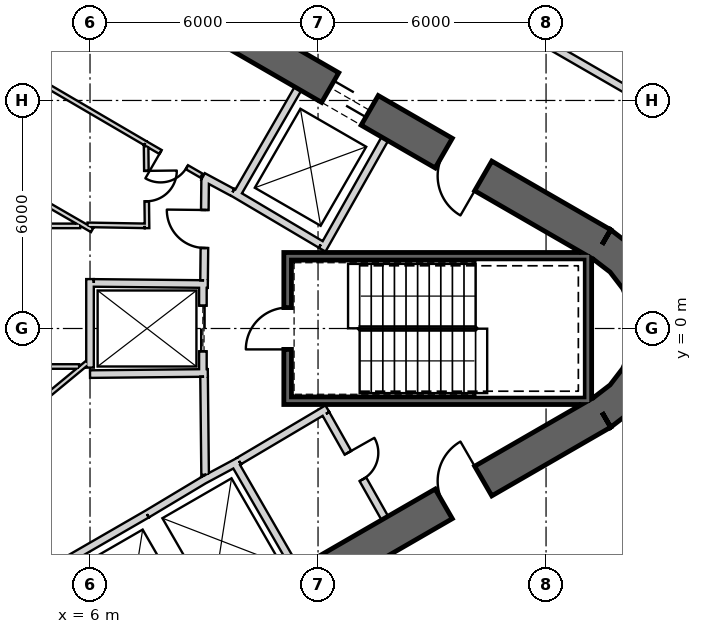
"""IFC4 building model, lengths in metres.
Left out: names, types, materials, properties, quantities, classifications, styles, units other than length and angle.
Written with IfcOpenShell. Run it as: python <this file> out.ifc"""

import sys

from ifc_helpers import new_model, si_unit, direction, frame, frame_2d, origin, place, context, subcontext, project, spatial, polyline, rectangle, outline, extrude, element, fill, save


model = new_model("IFC4")
c1 = context("Model", 3, precision=1e-05, world=origin(), true_north=direction((0.0, 1.0)))
c2 = subcontext(c1, "Body", "Model", "MODEL_VIEW")
j1 = project(units=[si_unit("LENGTHUNIT", "METRE"), si_unit("PLANEANGLEUNIT", "RADIAN")], contexts=[c1])
p1 = place(None, origin())
s1 = spatial("IfcSite", under=j1, at=p1, CompositionType="ELEMENT")
p2 = place(p1, origin())
s2 = spatial("IfcBuilding", under=s1, at=p2, CompositionType="ELEMENT")
p3 = place(p2, frame((0.0, 0.0, 345.5)))
s3 = spatial("IfcBuildingStorey", under=s2, at=p3, CompositionType="ELEMENT", Elevation=345.5)
p4 = place(p3, frame((19.475, 2.208, 0.0), z_axis=(0.0, 0.0, 1.0), x_axis=(-0.866028369851, 0.499994862586, 0.0)))
e1 = element("IfcWall", 1, at=p4, inside=s3, PredefinedType="SHEAR", context=c2, shape_type="SweptSolid", body=[
    extrude(rectangle(XDim=31.523, YDim=0.9, at=frame_2d((15.762, 0.0))), origin(), (0.0, 0.0, 1.0), 3.9),
])
p5 = place(p4, frame((7.062, 0.0, 0.0)))
e2 = element("IfcOpeningElement", 2, at=p5, cuts=e1, PredefinedType="OPENING", context=c2, shape_type="SweptSolid", body=[
    extrude(rectangle(XDim=1.2, YDim=2.4, at=frame_2d((0.6, 1.2))), frame((0.0, 0.46, 0.0), z_axis=(0.0, -1.0, 0.0), x_axis=(1.0, 0.0, 0.0)), (0.0, 0.0, 1.0), 0.92),
])
p6 = place(p4, frame((3.612, 0.0, 0.0)))
e3 = element("IfcOpeningElement", 3, at=p6, cuts=e1, PredefinedType="OPENING", context=c2, shape_type="SweptSolid", body=[
    extrude(rectangle(XDim=1.2, YDim=2.4, at=frame_2d((0.6, 1.2))), frame((0.0, 0.46, 0.0), z_axis=(0.0, -1.0, 0.0), x_axis=(1.0, 0.0, 0.0)), (0.0, 0.0, 1.0), 0.92),
])
p7 = place(p4, frame((26.712, 0.0, 0.0)))
e4 = element("IfcOpeningElement", 4, at=p7, cuts=e1, PredefinedType="OPENING", context=c2, shape_type="SweptSolid", body=[
    extrude(rectangle(XDim=1.2, YDim=2.4, at=frame_2d((0.6, 1.2))), frame((0.0, 0.46, 0.0), z_axis=(0.0, -1.0, 0.0), x_axis=(1.0, 0.0, 0.0)), (0.0, 0.0, 1.0), 0.92),
])
p8 = place(p3, frame((-7.825, -17.97, 0.0), z_axis=(0.0, 0.0, 1.0), x_axis=(0.866028369851, 0.499994862586, 0.0)))
e5 = element("IfcWall", 5, at=p8, inside=s3, PredefinedType="SHEAR", context=c2, shape_type="SweptSolid", body=[
    extrude(rectangle(XDim=31.523, YDim=0.9, at=frame_2d((15.762, 0.0))), origin(), (0.0, 0.0, 1.0), 3.9),
])
p9 = place(p8, frame((17.862, 0.0, 0.0)))
e6 = element("IfcOpeningElement", 6, at=p9, cuts=e5, PredefinedType="OPENING", context=c2, shape_type="SweptSolid", body=[
    extrude(rectangle(XDim=1.2, YDim=2.4, at=frame_2d((0.6, 1.2))), frame((0.0, 0.46, 0.0), z_axis=(0.0, -1.0, 0.0), x_axis=(1.0, 0.0, 0.0)), (0.0, 0.0, 1.0), 0.92),
])
p10 = place(p8, frame((20.562, 0.0, 0.0)))
e7 = element("IfcOpeningElement", 7, at=p10, cuts=e5, PredefinedType="OPENING", context=c2, shape_type="SweptSolid", body=[
    extrude(rectangle(XDim=1.2, YDim=2.4, at=frame_2d((0.6, 1.2))), frame((0.0, 0.46, 0.0), z_axis=(0.0, -1.0, 0.0), x_axis=(1.0, 0.0, 0.0)), (0.0, 0.0, 1.0), 0.92),
])
p11 = place(p8, frame((26.712, 0.0, 0.0)))
e8 = element("IfcOpeningElement", 8, at=p11, cuts=e5, PredefinedType="OPENING", context=c2, shape_type="SweptSolid", body=[
    extrude(rectangle(XDim=1.2, YDim=2.4, at=frame_2d((0.6, 1.2))), frame((0.0, 0.46, 0.0), z_axis=(0.0, -1.0, 0.0), x_axis=(1.0, 0.0, 0.0)), (0.0, 0.0, 1.0), 0.92),
])
p12 = place(p8, frame((3.612, 0.0, 0.0)))
e9 = element("IfcOpeningElement", 9, at=p12, cuts=e5, PredefinedType="OPENING", context=c2, shape_type="SweptSolid", body=[
    extrude(rectangle(XDim=1.2, YDim=2.4, at=frame_2d((0.6, 1.2))), frame((0.0, 0.46, 0.0), z_axis=(0.0, -1.0, 0.0), x_axis=(1.0, 0.0, 0.0)), (0.0, 0.0, 1.0), 0.92),
])
p13 = place(p3, origin())
e10 = element("IfcWall", 10, at=p13, inside=s3, PredefinedType="SHEAR", context=c2, shape_type="SweptSolid", body=[
    extrude(outline(polyline([(19.7, -2.598), (20.321, -2.121), (20.798, -1.5), (21.098, -0.777), (21.2, 0.0), (21.098, 0.777), (20.798, 1.5), (20.321, 2.121), (19.7, 2.598), (19.25, 1.819), (19.685, 1.485), (20.019, 1.05), (20.229, 0.543), (20.3, 0.0), (20.229, -0.543), (20.019, -1.05), (19.685, -1.485), (19.25, -1.819), (19.7, -2.598)])), origin(), (0.0, 0.0, 1.0), 3.9),
])
p14 = place(p3, frame((9.847, 3.495, 0.0), z_axis=(0.0, 0.0, 1.0), x_axis=(0.499984717929, 0.866034226713, 0.0)))
e11 = element("IfcWall", 11, at=p14, inside=s3, PredefinedType="PLUMBINGWALL", context=c2, shape_type="SweptSolid", body=[
    extrude(rectangle(XDim=3.25, YDim=0.2, at=frame_2d((1.625, 0.0))), origin(), (0.0, 0.0, 1.0), 3.6),
])
p15 = place(p3, frame((12.11, 2.073, 0.0), z_axis=(0.0, 0.0, 1.0), x_axis=(0.49196600604, 0.870614408852, 0.0)))
e12 = element("IfcWall", 12, at=p15, inside=s3, PredefinedType="PLUMBINGWALL", context=c2, shape_type="SweptSolid", body=[
    extrude(rectangle(XDim=3.35, YDim=0.2, at=frame_2d((1.675, 0.0))), origin(), (0.0, 0.0, 1.0), 3.6),
])
p16 = place(p3, frame((12.073, 2.211, 0.0), z_axis=(0.0, 0.0, 1.0), x_axis=(-0.860414880418, 0.509594185166, 0.0)))
e13 = element("IfcWall", 13, at=p16, inside=s3, PredefinedType="PLUMBINGWALL", context=c2, shape_type="SweptSolid", body=[
    extrude(rectangle(XDim=2.7, YDim=0.2, at=frame_2d((1.35, 0.0))), origin(), (0.0, 0.0, 1.0), 3.6),
])
p17 = place(p3, frame((5.159, -6.236, 0.0), z_axis=(0.0, 0.0, 1.0), x_axis=(0.866036505625, 0.499980770555, 0.0)))
e14 = element("IfcWall", 14, at=p17, inside=s3, PredefinedType="PLUMBINGWALL", context=c2, shape_type="SweptSolid", body=[
    extrude(rectangle(XDim=2.7, YDim=0.2, at=frame_2d((1.35, 0.0))), origin(), (0.0, 0.0, 1.0), 3.6),
])
p18 = place(p3, frame((9.795, -3.525, 0.0), z_axis=(0.0, 0.0, 1.0), x_axis=(0.499984717929, -0.866034226713, 0.0)))
e15 = element("IfcWall", 15, at=p18, inside=s3, PredefinedType="PLUMBINGWALL", context=c2, shape_type="SweptSolid", body=[
    extrude(rectangle(XDim=3.25, YDim=0.2, at=frame_2d((1.625, 0.0))), origin(), (0.0, 0.0, 1.0), 3.6),
])
p19 = place(p3, frame((8.974, -3.999, 0.0), z_axis=(0.0, 0.0, 1.0), x_axis=(0.880907015104, 0.473289373154, 0.0)))
e16 = element("IfcWall", 16, at=p19, inside=s3, PredefinedType="PLUMBINGWALL", context=c2, shape_type="SweptSolid", body=[
    extrude(rectangle(XDim=1.078, YDim=0.2, at=frame_2d((0.539, 0.0))), origin(), (0.0, 0.0, 1.0), 3.6),
])
p20 = place(p3, frame((7.497, -4.886, 0.0), z_axis=(0.0, 0.0, 1.0), x_axis=(0.857516281273, 0.51445682749, 0.0)))
e17 = element("IfcWall", 17, at=p20, inside=s3, PredefinedType="PLUMBINGWALL", context=c2, shape_type="SweptSolid", body=[
    extrude(rectangle(XDim=1.845, YDim=0.2, at=frame_2d((0.922, 0.0))), origin(), (0.0, 0.0, 1.0), 3.6),
])
p21 = place(p3, frame((19.2, 1.9, -0.3), z_axis=(0.0, 0.0, 1.0), x_axis=(-1.0, 0.0, 0.0)))
e18 = element("IfcWall", 18, at=p21, inside=s3, PredefinedType="SHEAR", context=c2, shape_type="SweptSolid", body=[
    extrude(rectangle(XDim=8.1, YDim=0.2, at=frame_2d((4.05, 0.0))), origin(), (0.0, 0.0, 1.0), 3.9),
])
p22 = place(p3, frame((19.1, -2.0, -0.3), z_axis=(0.0, 0.0, 1.0), x_axis=(0.0, 1.0, 0.0)))
e19 = element("IfcWall", 19, at=p22, inside=s3, PredefinedType="SHEAR", context=c2, shape_type="SweptSolid", body=[
    extrude(rectangle(XDim=3.8, YDim=0.2, at=frame_2d((1.9, 0.0))), origin(), (0.0, 0.0, 1.0), 3.9),
])
p23 = place(p3, frame((11.1, -1.9, -0.3), z_axis=(0.0, 0.0, 1.0), x_axis=(1.0, 0.0, 0.0)))
e20 = element("IfcWall", 20, at=p23, inside=s3, PredefinedType="SHEAR", context=c2, shape_type="SweptSolid", body=[
    extrude(rectangle(XDim=7.9, YDim=0.2, at=frame_2d((3.95, 0.0))), origin(), (0.0, 0.0, 1.0), 3.9),
])
p24 = place(p3, frame((11.2, -1.8, -0.3), z_axis=(0.0, 0.0, 1.0), x_axis=(0.0, 1.0, 0.0)))
e21 = element("IfcWall", 21, at=p24, inside=s3, PredefinedType="SHEAR", context=c2, shape_type="SweptSolid", body=[
    extrude(rectangle(XDim=3.6, YDim=0.2, at=frame_2d((1.8, 0.0))), origin(), (0.0, 0.0, 1.0), 3.9),
])
p25 = place(p24, frame((1.25, 0.0, 0.3)))
e22 = element("IfcOpeningElement", 22, at=p25, cuts=e21, PredefinedType="OPENING", context=c2, shape_type="SweptSolid", body=[
    extrude(rectangle(XDim=1.1, YDim=2.1, at=frame_2d((0.55, 1.05))), frame((0.0, 0.11, 0.0), z_axis=(0.0, -1.0, 0.0), x_axis=(1.0, 0.0, 0.0)), (0.0, 0.0, 1.0), 0.22),
])
p26 = place(p3, frame((8.97, 1.2, 0.0), z_axis=(0.0, 0.0, 1.0), x_axis=(0.0, -1.0, 0.0)))
e23 = element("IfcWall", 23, at=p26, inside=s3, PredefinedType="PLUMBINGWALL", context=c2, shape_type="SweptSolid", body=[
    extrude(rectangle(XDim=2.4, YDim=0.2, at=frame_2d((1.2, 0.0))), origin(), (0.0, 0.0, 1.0), 3.6),
])
p27 = place(p26, frame((0.6, 0.0, 0.0)))
e24 = element("IfcOpeningElement", 24, at=p27, cuts=e23, PredefinedType="OPENING", context=c2, shape_type="SweptSolid", body=[
    extrude(rectangle(XDim=1.2, YDim=2.4, at=frame_2d((0.6, 1.2))), frame((0.0, 0.11, 0.0), z_axis=(0.0, -1.0, 0.0), x_axis=(1.0, 0.0, 0.0)), (0.0, 0.0, 1.0), 0.22),
])
p28 = place(p3, frame((9.1, -1.169, 0.0), z_axis=(0.0, 0.0, 1.0), x_axis=(-0.999949988, -0.010001074852, 0.0)))
e25 = element("IfcWall", 25, at=p28, inside=s3, PredefinedType="PLUMBINGWALL", context=c2, shape_type="SweptSolid", body=[
    extrude(rectangle(XDim=3.1, YDim=0.2, at=frame_2d((1.55, 0.0))), origin(), (0.0, 0.0, 1.0), 3.6),
])
p29 = place(p3, frame((6.0, -1.03, 0.0), z_axis=(0.0, 0.0, 1.0), x_axis=(0.0, 1.0, 0.0)))
e26 = element("IfcWall", 26, at=p29, inside=s3, PredefinedType="PLUMBINGWALL", context=c2, shape_type="SweptSolid", body=[
    extrude(rectangle(XDim=2.33, YDim=0.2, at=frame_2d((1.165, 0.0))), origin(), (0.0, 0.0, 1.0), 3.6),
])
p30 = place(p3, frame((9.1, 1.169, 0.0), z_axis=(0.0, 0.0, 1.0), x_axis=(-0.99994990606, 0.010009264196, 0.0)))
e27 = element("IfcWall", 27, at=p30, inside=s3, PredefinedType="PLUMBINGWALL", context=c2, shape_type="SweptSolid", body=[
    extrude(rectangle(XDim=3.0, YDim=0.2, at=frame_2d((1.5, 0.0))), origin(), (0.0, 0.0, 1.0), 3.6),
])
p31 = place(p3, frame((8.974, 3.999, 0.0), z_axis=(0.0, 0.0, 1.0), x_axis=(0.880917147855, -0.473270513147, 0.0)))
e28 = element("IfcWall", 28, at=p31, inside=s3, PredefinedType="PARTITIONING", context=c2, shape_type="SweptSolid", body=[
    extrude(rectangle(XDim=0.878, YDim=0.2, at=frame_2d((0.439, 0.0))), origin(), (0.0, 0.0, 1.0), 3.6),
])
p32 = place(p3, frame((2.821, 7.586, 0.0), z_axis=(0.0, 0.0, 1.0), x_axis=(0.863262357411, -0.504755487615, 0.0)))
e29 = element("IfcWall", 29, at=p32, inside=s3, PredefinedType="PARTITIONING", context=c2, shape_type="SweptSolid", body=[
    extrude(rectangle(XDim=5.37, YDim=0.12, at=frame_2d((2.685, 0.0))), origin(), (0.0, 0.0, 1.0), 3.6),
])
p33 = place(p3, frame((7.457, 4.875, 0.0), z_axis=(0.0, 0.0, 1.0), x_axis=(0.866027945518, -0.499995597562, 0.0)))
e30 = element("IfcWall", 30, at=p33, inside=s3, PredefinedType="PARTITIONING", context=c2, shape_type="SweptSolid", body=[
    extrude(rectangle(XDim=1.702, YDim=0.12, at=frame_2d((0.851, 0.0))), origin(), (0.0, 0.0, 1.0), 3.6),
])
p34 = place(p33, frame((0.461, 0.0, 0.0)))
e31 = element("IfcOpeningElement", 31, at=p34, cuts=e30, PredefinedType="OPENING", context=c2, shape_type="SweptSolid", body=[
    extrude(rectangle(XDim=0.8, YDim=2.1, at=frame_2d((0.4, 1.05))), frame((0.0, 0.07, 0.0), z_axis=(0.0, -1.0, 0.0), x_axis=(1.0, 0.0, 0.0)), (0.0, 0.0, 1.0), 0.14),
])
p35 = place(p3, frame((12.245, -2.109, 0.0), z_axis=(0.0, 0.0, 1.0), x_axis=(-0.860414880418, -0.509594185166, 0.0)))
e32 = element("IfcWall", 32, at=p35, inside=s3, PredefinedType="PARTITIONING", context=c2, shape_type="SweptSolid", body=[
    extrude(rectangle(XDim=2.7, YDim=0.2, at=frame_2d((1.35, 0.0))), origin(), (0.0, 0.0, 1.0), 3.6),
])
p36 = place(p3, frame((13.758, -4.99, 0.0), z_axis=(0.0, 0.0, 1.0), x_axis=(-0.491993409184, 0.87059892334, 0.0)))
e33 = element("IfcWall", 33, at=p36, inside=s3, PredefinedType="PARTITIONING", context=c2, shape_type="SweptSolid", body=[
    extrude(rectangle(XDim=3.15, YDim=0.2, at=frame_2d((1.575, 0.0))), origin(), (0.0, 0.0, 1.0), 3.6),
])
p37 = place(p36, frame((1.175, 0.0, 0.0)))
e34 = element("IfcOpeningElement", 34, at=p37, cuts=e33, PredefinedType="OPENING", context=c2, shape_type="SweptSolid", body=[
    extrude(rectangle(XDim=0.8, YDim=2.1, at=frame_2d((0.4, 1.05))), frame((0.0, 0.11, 0.0), z_axis=(0.0, -1.0, 0.0), x_axis=(1.0, 0.0, 0.0)), (0.0, 0.0, 1.0), 0.22),
])
p38 = place(p3, frame((9.029, -3.851, 0.0), z_axis=(0.0, 0.0, 1.0), x_axis=(-0.010784614026, 0.999941844359, 0.0)))
e35 = element("IfcWall", 35, at=p38, inside=s3, PredefinedType="PARTITIONING", context=c2, shape_type="SweptSolid", body=[
    extrude(rectangle(XDim=2.581, YDim=0.2, at=frame_2d((1.291, 0.0))), origin(), (0.0, 0.0, 1.0), 3.6),
])
p39 = place(p3, frame((9.001, 1.27, 0.0), z_axis=(0.0, 0.0, 1.0), x_axis=(0.010723968736, 0.999942496594, 0.0)))
e36 = element("IfcWall", 36, at=p39, inside=s3, PredefinedType="PARTITIONING", context=c2, shape_type="SweptSolid", body=[
    extrude(rectangle(XDim=2.709, YDim=0.2, at=frame_2d((1.354, 0.0))), origin(), (0.0, 0.0, 1.0), 3.6),
])
p40 = place(p39, frame((0.848, 0.0, 0.0)))
e37 = element("IfcOpeningElement", 37, at=p40, cuts=e36, PredefinedType="OPENING", context=c2, shape_type="SweptSolid", body=[
    extrude(rectangle(XDim=1.0, YDim=2.1, at=frame_2d((0.5, 1.05))), frame((0.0, 0.11, 0.0), z_axis=(0.0, -1.0, 0.0), x_axis=(1.0, 0.0, 0.0)), (0.0, 0.0, 1.0), 0.22),
])
p41 = place(p3, frame((5.936, -0.894, 0.0), z_axis=(0.0, 0.0, 1.0), x_axis=(-0.770832870475, -0.637037428881, 0.0)))
e38 = element("IfcWall", 38, at=p41, inside=s3, PredefinedType="PARTITIONING", context=c2, shape_type="SweptSolid", body=[
    extrude(rectangle(XDim=8.332, YDim=0.12, at=frame_2d((4.166, 0.0))), origin(), (0.0, 0.0, 1.0), 3.6),
])
p42 = place(p3, frame((5.713, -1.0, 0.0), z_axis=(0.0, 0.0, 1.0), x_axis=(-1.0, 0.0, 0.0)))
e39 = element("IfcWall", 39, at=p42, inside=s3, PredefinedType="PARTITIONING", context=c2, shape_type="SweptSolid", body=[
    extrude(rectangle(XDim=3.183, YDim=0.12, at=frame_2d((1.591, 0.0))), origin(), (0.0, 0.0, 1.0), 3.6),
])
p43 = place(p3, frame((-0.786, 6.538, 0.0), z_axis=(0.0, 0.0, 1.0), x_axis=(0.866034288228, -0.499984611377, 0.0)))
e40 = element("IfcWall", 40, at=p43, inside=s3, PredefinedType="PARTITIONING", context=c2, shape_type="SweptSolid", body=[
    extrude(rectangle(XDim=7.9, YDim=0.12, at=frame_2d((3.95, 0.0))), origin(), (0.0, 0.0, 1.0), 3.6),
])
p44 = place(p3, frame((4.44, 2.7, 0.0), z_axis=(0.0, 0.0, 1.0), x_axis=(1.0, 0.0, 0.0)))
e41 = element("IfcWall", 41, at=p44, inside=s3, PredefinedType="PARTITIONING", context=c2, shape_type="SweptSolid", body=[
    extrude(rectangle(XDim=1.302, YDim=0.12, at=frame_2d((0.651, 0.0))), origin(), (0.0, 0.0, 1.0), 3.6),
])
p45 = place(p3, frame((7.501, 2.64, 0.0), z_axis=(0.0, 0.0, 1.0), x_axis=(-0.01178388431, 0.999930567625, 0.0)))
e42 = element("IfcWall", 42, at=p45, inside=s3, PredefinedType="PARTITIONING", context=c2, shape_type="SweptSolid", body=[
    extrude(rectangle(XDim=2.155, YDim=0.12, at=frame_2d((1.077, 0.0))), origin(), (0.0, 0.0, 1.0), 3.6),
])
p46 = place(p45, frame((0.707, 0.0, 0.0)))
e43 = element("IfcOpeningElement", 43, at=p46, cuts=e42, PredefinedType="OPENING", context=c2, shape_type="SweptSolid", body=[
    extrude(rectangle(XDim=0.8, YDim=2.1, at=frame_2d((0.4, 1.05))), frame((0.0, 0.07, 0.0), z_axis=(0.0, -1.0, 0.0), x_axis=(1.0, 0.0, 0.0)), (0.0, 0.0, 1.0), 0.14),
])
p47 = place(p3, frame((5.934, 2.727, 0.0), z_axis=(0.0, 0.0, 1.0), x_axis=(0.999846739959, -0.017507044085, 0.0)))
e44 = element("IfcWall", 44, at=p47, inside=s3, PredefinedType="PARTITIONING", context=c2, shape_type="SweptSolid", body=[
    extrude(rectangle(XDim=1.506, YDim=0.12, at=frame_2d((0.753, 0.0))), origin(), (0.0, 0.0, 1.0), 3.6),
])
p48 = place(p3, frame((22.074, 5.153, 0.0), z_axis=(0.0, 0.0, 1.0), x_axis=(-0.866023485483, 0.500003322581, 0.0)))
e45 = element("IfcWall", 45, at=p48, inside=s3, PredefinedType="PARTITIONING", context=c2, shape_type="SweptSolid", body=[
    extrude(rectangle(XDim=32.881, YDim=0.2, at=frame_2d((16.44, 0.0))), origin(), (0.0, 0.0, 1.0), 2.97),
])
p49 = place(p48, frame((15.99, 0.0, 0.0)))
e46 = element("IfcOpeningElement", 46, at=p49, cuts=e45, PredefinedType="OPENING", context=c2, shape_type="SweptSolid", body=[
    extrude(rectangle(XDim=1.0, YDim=2.1, at=frame_2d((0.5, 1.05))), frame((0.0, 0.11, 0.0), z_axis=(0.0, -1.0, 0.0), x_axis=(1.0, 0.0, 0.0)), (0.0, 0.0, 1.0), 0.22),
])
p50 = place(p3, frame((-6.505, -21.885, 0.0), z_axis=(0.0, 0.0, 1.0), x_axis=(0.86602457258, 0.500001439686, 0.0)))
e47 = element("IfcWall", 47, at=p50, inside=s3, PredefinedType="PARTITIONING", context=c2, shape_type="SweptSolid", body=[
    extrude(rectangle(XDim=32.952, YDim=0.2, at=frame_2d((16.476, 0.0))), origin(), (0.0, 0.0, 1.0), 2.97),
])
p51 = place(p50, frame((27.839, 0.0, 0.0)))
e48 = element("IfcOpeningElement", 48, at=p51, cuts=e47, PredefinedType="OPENING", context=c2, shape_type="SweptSolid", body=[
    extrude(rectangle(XDim=1.0, YDim=2.1, at=frame_2d((0.5, 1.05))), frame((0.0, 0.11, 0.0), z_axis=(0.0, -1.0, 0.0), x_axis=(1.0, 0.0, 0.0)), (0.0, 0.0, 1.0), 0.22),
])
p52 = place(p50, frame((15.873, 0.0, 0.0)))
e49 = element("IfcOpeningElement", 49, at=p52, cuts=e47, PredefinedType="OPENING", context=c2, shape_type="SweptSolid", body=[
    extrude(rectangle(XDim=1.0, YDim=2.1, at=frame_2d((0.5, 1.05))), frame((0.0, 0.11, 0.0), z_axis=(0.0, -1.0, 0.0), x_axis=(1.0, 0.0, 0.0)), (0.0, 0.0, 1.0), 0.22),
])
p53 = place(p50, frame((4.06, 0.0, 0.0)))
e50 = element("IfcOpeningElement", 50, at=p53, cuts=e47, PredefinedType="OPENING", context=c2, shape_type="SweptSolid", body=[
    extrude(rectangle(XDim=1.0, YDim=2.1, at=frame_2d((0.5, 1.05))), frame((0.0, 0.11, 0.0), z_axis=(0.0, -1.0, 0.0), x_axis=(1.0, 0.0, 0.0)), (0.0, 0.0, 1.0), 0.22),
])
p54 = place(p25, origin())
e51 = element("IfcDoor", 51, at=p54, inside=s3, OperationType="SINGLE_SWING_LEFT", PredefinedType="USERDEFINED", context=c2, shape_type="SweptSolid", body=[
    extrude(rectangle(XDim=1.1, YDim=2.1, at=frame_2d((0.55, 1.05))), frame((0.0, 0.025, 0.0), z_axis=(0.0, -1.0, 0.0), x_axis=(1.0, 0.0, 0.0)), (0.0, 0.0, 1.0), 0.05),
])
fill(e22, e51)
p55 = place(p40, origin())
e52 = element("IfcDoor", 52, at=p55, inside=s3, OperationType="SINGLE_SWING_LEFT", PredefinedType="USERDEFINED", context=c2, shape_type="SweptSolid", body=[
    extrude(rectangle(XDim=1.0, YDim=2.1, at=frame_2d((0.5, 1.05))), frame((0.0, 0.025, 0.0), z_axis=(0.0, -1.0, 0.0), x_axis=(1.0, 0.0, 0.0)), (0.0, 0.0, 1.0), 0.05),
])
fill(e37, e52)
p56 = place(p27, origin())
e53 = element("IfcDoor", 53, at=p56, inside=s3, OperationType="SLIDING_TO_LEFT", PredefinedType="USERDEFINED", context=c2, shape_type="SweptSolid", body=[
    extrude(rectangle(XDim=1.2, YDim=2.4, at=frame_2d((0.6, 1.2))), frame((0.0, 0.025, 0.0), z_axis=(0.0, -1.0, 0.0), x_axis=(1.0, 0.0, 0.0)), (0.0, 0.0, 1.0), 0.05),
])
fill(e24, e53)
p57 = place(p46, origin())
e54 = element("IfcDoor", 54, at=p57, inside=s3, OperationType="SINGLE_SWING_LEFT", PredefinedType="USERDEFINED", context=c2, shape_type="SweptSolid", body=[
    extrude(rectangle(XDim=0.8, YDim=2.1, at=frame_2d((0.4, 1.05))), frame((0.0, 0.025, 0.0), z_axis=(0.0, -1.0, 0.0), x_axis=(1.0, 0.0, 0.0)), (0.0, 0.0, 1.0), 0.05),
])
fill(e43, e54)
p58 = place(p34, origin())
e55 = element("IfcDoor", 55, at=p58, inside=s3, OperationType="SINGLE_SWING_RIGHT", PredefinedType="USERDEFINED", context=c2, shape_type="SweptSolid", body=[
    extrude(rectangle(XDim=0.8, YDim=2.1, at=frame_2d((0.4, 1.05))), frame((0.0, 0.025, 0.0), z_axis=(0.0, -1.0, 0.0), x_axis=(1.0, 0.0, 0.0)), (0.0, 0.0, 1.0), 0.05),
])
fill(e31, e55)
p59 = place(p37, origin())
e56 = element("IfcDoor", 56, at=p59, inside=s3, OperationType="SINGLE_SWING_RIGHT", PredefinedType="USERDEFINED", context=c2, shape_type="SweptSolid", body=[
    extrude(rectangle(XDim=0.8, YDim=2.1, at=frame_2d((0.4, 1.05))), frame((0.0, 0.025, 0.0), z_axis=(0.0, -1.0, 0.0), x_axis=(1.0, 0.0, 0.0)), (0.0, 0.0, 1.0), 0.05),
])
fill(e34, e56)
p60 = place(p5, origin())
e57 = element("IfcDoor", 57, at=p60, inside=s3, OperationType="SLIDING_TO_LEFT", PredefinedType="USERDEFINED", context=c2, shape_type="SweptSolid", body=[
    extrude(rectangle(XDim=1.2, YDim=2.4, at=frame_2d((0.6, 1.2))), frame((0.0, 0.025, 0.0), z_axis=(0.0, -1.0, 0.0), x_axis=(1.0, 0.0, 0.0)), (0.0, 0.0, 1.0), 0.05),
])
fill(e2, e57)
p61 = place(p11, origin())
e58 = element("IfcDoor", 58, at=p61, inside=s3, OperationType="SINGLE_SWING_RIGHT", PredefinedType="USERDEFINED", context=c2, shape_type="SweptSolid", body=[
    extrude(rectangle(XDim=1.2, YDim=2.4, at=frame_2d((0.6, 1.2))), frame((0.0, 0.025, 0.0), z_axis=(0.0, -1.0, 0.0), x_axis=(1.0, 0.0, 0.0)), (0.0, 0.0, 1.0), 0.05),
])
fill(e8, e58)
p62 = place(p6, origin())
e59 = element("IfcDoor", 59, at=p62, inside=s3, OperationType="SINGLE_SWING_LEFT", PredefinedType="USERDEFINED", context=c2, shape_type="SweptSolid", body=[
    extrude(rectangle(XDim=1.2, YDim=2.4, at=frame_2d((0.6, 1.2))), frame((0.0, 0.025, 0.0), z_axis=(0.0, -1.0, 0.0), x_axis=(1.0, 0.0, 0.0)), (0.0, 0.0, 1.0), 0.05),
])
fill(e3, e59)
save(model, sys.argv[1])
